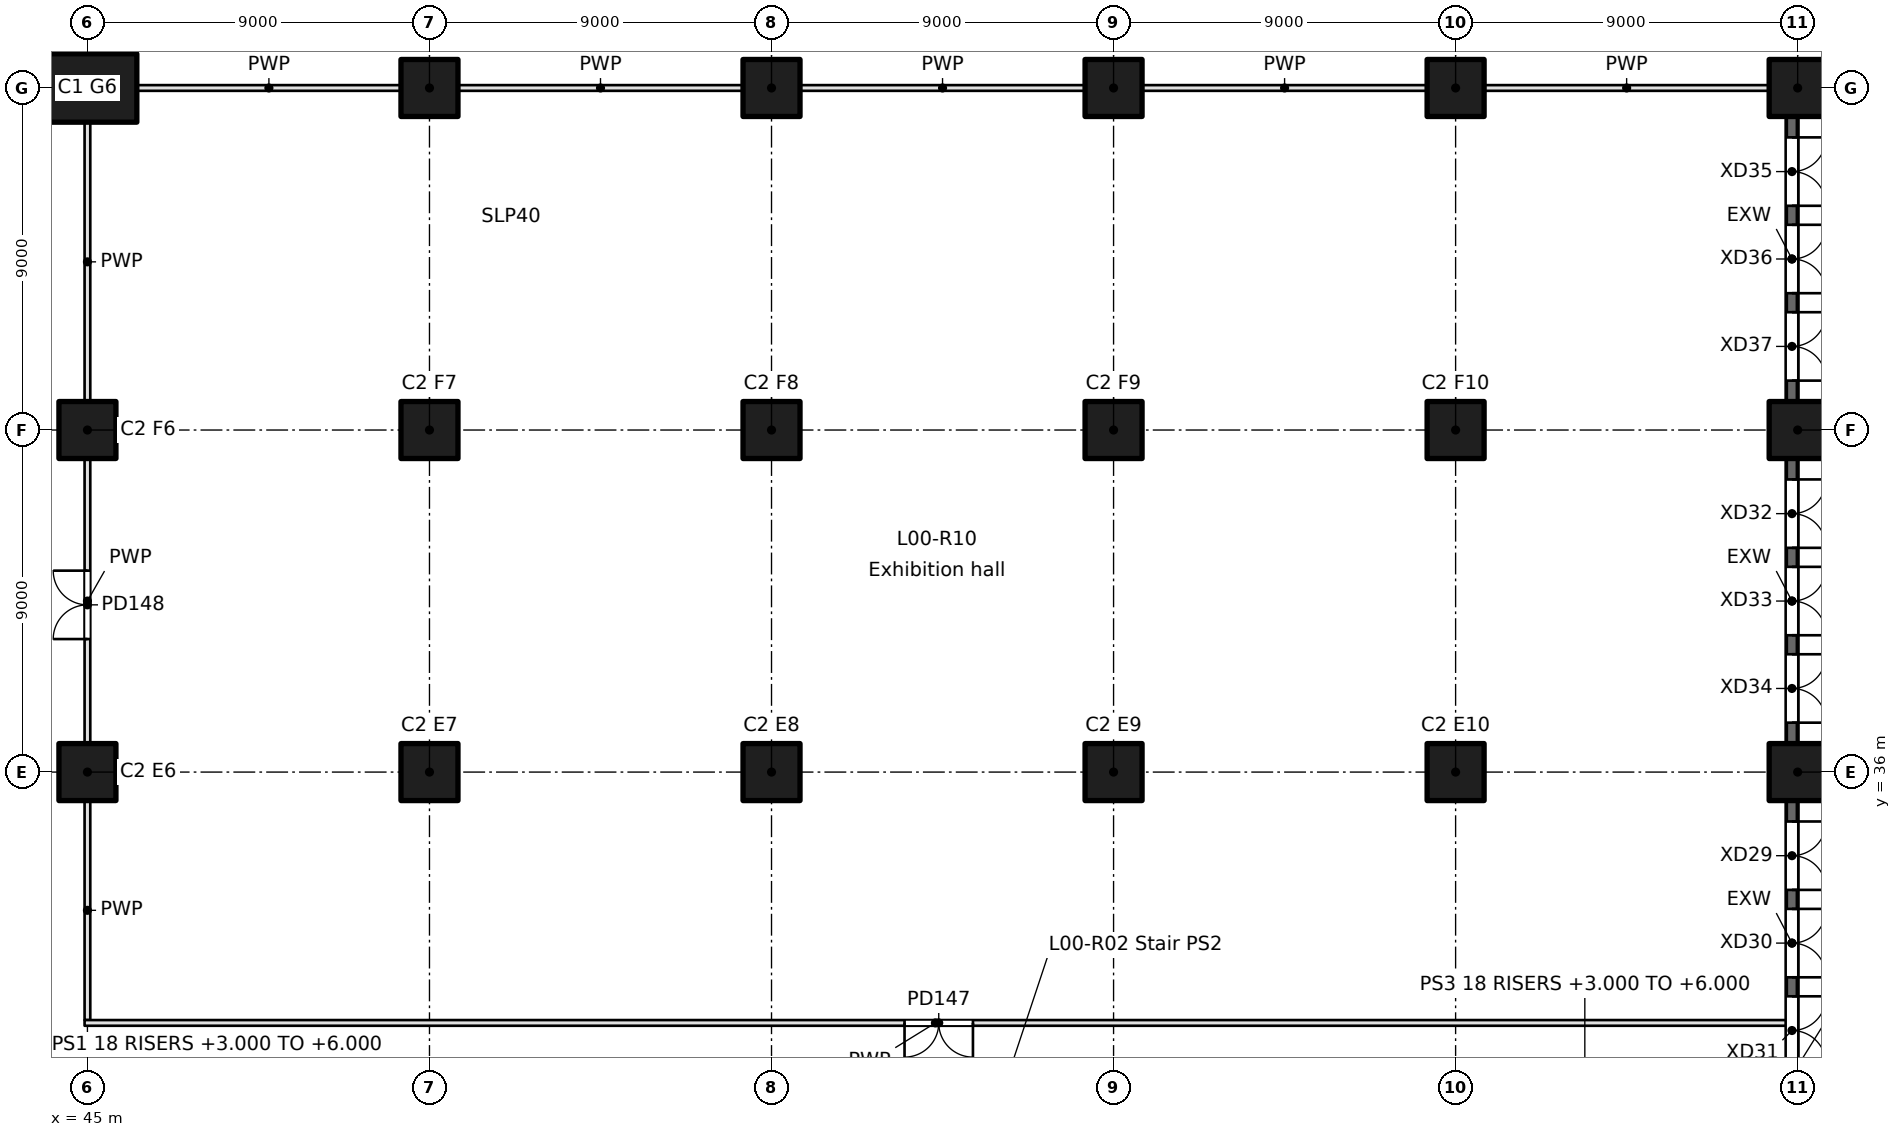
"""IFC4 building model, lengths in metres.
Left out: names, types, materials, properties, quantities, classifications, styles, units other than length and angle.
Written with IfcOpenShell. Run it as: python <this file> out.ifc"""

import sys

from ifc_helpers import new_model, si_unit, direction, frame, frame_2d, origin, origin_2d, place, context, subcontext, project, spatial, rectangle, extrude, element, fill, save


model = new_model("IFC4")
c1 = context("Model", 3, precision=1e-05, world=origin(), true_north=direction((0.0, 1.0)))
c2 = subcontext(c1, "Body", "Model", "MODEL_VIEW")
j1 = project(units=[si_unit("LENGTHUNIT", "METRE"), si_unit("PLANEANGLEUNIT", "RADIAN")], contexts=[c1])
p1 = place(None, origin())
s1 = spatial("IfcSite", under=j1, at=p1, CompositionType="ELEMENT")
p2 = place(p1, origin())
s2 = spatial("IfcBuilding", under=s1, at=p2, CompositionType="ELEMENT")
p3 = place(p2, origin())
s3 = spatial("IfcBuildingStorey", under=s2, at=p3, CompositionType="ELEMENT", Elevation=0.0)
for number, where, z_axis, x_axis in (
    (1, (45.0, 36.0, 0.0), (0.0, 0.0, 1.0), (1.0, 0.0, 0.0)),
    (2, (45.0, 45.0, 0.0), (0.0, 0.0, 1.0), (1.0, 0.0, 0.0)),
):
    element("IfcColumn", number, at=place(p3, frame(where, z_axis=z_axis, x_axis=x_axis)), inside=s3, PredefinedType="COLUMN", context=c2, shape_type="SweptSolid", body=[
        extrude(rectangle(XDim=1.5, YDim=1.5, at=origin_2d()), origin(), (0.0, 0.0, 1.0), 6.0),
    ])
p4 = place(p3, frame((45.0, 54.0, 0.0), z_axis=(0.0, 0.0, 1.0), x_axis=(1.0, 0.0, 0.0)))
e3 = element("IfcColumn", 3, at=p4, inside=s3, PredefinedType="COLUMN", context=c2, shape_type="SweptSolid", body=[
    extrude(rectangle(XDim=2.6, YDim=1.8, at=origin_2d()), origin(), (0.0, 0.0, 1.0), 6.0),
])
for number, where, z_axis, x_axis in (
    (4, (54.0, 54.0, 0.0), (0.0, 0.0, 1.0), (1.0, 0.0, 0.0)),
    (5, (63.0, 54.0, 0.0), (0.0, 0.0, 1.0), (1.0, 0.0, 0.0)),
    (6, (72.0, 54.0, 0.0), (0.0, 0.0, 1.0), (1.0, 0.0, 0.0)),
    (7, (81.0, 54.0, 0.0), (0.0, 0.0, 1.0), (1.0, 0.0, 0.0)),
    (8, (90.0, 54.0, 0.0), (0.0, 0.0, 1.0), (1.0, 0.0, 0.0)),
    (9, (90.0, 36.0, 0.0), (0.0, 0.0, 1.0), (1.0, 0.0, 0.0)),
    (10, (90.0, 45.0, 0.0), (0.0, 0.0, 1.0), (1.0, 0.0, 0.0)),
    (11, (54.0, 36.0, 0.0), (0.0, 0.0, 1.0), (1.0, 0.0, 0.0)),
    (12, (54.0, 45.0, 0.0), (0.0, 0.0, 1.0), (1.0, 0.0, 0.0)),
    (13, (63.0, 36.0, 0.0), (0.0, 0.0, 1.0), (1.0, 0.0, 0.0)),
    (14, (63.0, 45.0, 0.0), (0.0, 0.0, 1.0), (1.0, 0.0, 0.0)),
    (15, (72.0, 36.0, 0.0), (0.0, 0.0, 1.0), (1.0, 0.0, 0.0)),
    (16, (72.0, 45.0, 0.0), (0.0, 0.0, 1.0), (1.0, 0.0, 0.0)),
    (17, (81.0, 36.0, 0.0), (0.0, 0.0, 1.0), (1.0, 0.0, 0.0)),
    (18, (81.0, 45.0, 0.0), (0.0, 0.0, 1.0), (1.0, 0.0, 0.0)),
):
    element("IfcColumn", number, at=place(p3, frame(where, z_axis=z_axis, x_axis=x_axis)), inside=s3, PredefinedType="COLUMN", context=c2, shape_type="SweptSolid", body=[
        extrude(rectangle(XDim=1.5, YDim=1.5, at=origin_2d()), origin(), (0.0, 0.0, 1.0), 6.0),
    ])
p5 = place(p3, frame((89.85, 35.25, 0.0), z_axis=(0.0, 0.0, 1.0), x_axis=(0.0, -1.0, 0.0)))
e19 = element("IfcWall", 19, at=p5, inside=s3, PredefinedType="SOLIDWALL", context=c2, shape_type="SweptSolid", body=[
    extrude(rectangle(XDim=7.5, YDim=0.3, at=frame_2d((3.75, 0.0))), origin(), (0.0, 0.0, 1.0), 5.65),
])
p6 = place(p5, frame((0.55, 0.0, 0.0)))
e20 = element("IfcOpeningElement", 20, at=p6, cuts=e19, PredefinedType="OPENING", context=c2, shape_type="SweptSolid", body=[
    extrude(rectangle(XDim=1.8, YDim=2.4, at=frame_2d((0.9, 1.2))), frame((0.0, 0.15, 0.0), z_axis=(0.0, -1.0, 0.0), x_axis=(1.0, 0.0, 0.0)), (0.0, 0.0, 1.0), 0.3),
])
p7 = place(p5, frame((2.85, 0.0, 0.0)))
e21 = element("IfcOpeningElement", 21, at=p7, cuts=e19, PredefinedType="OPENING", context=c2, shape_type="SweptSolid", body=[
    extrude(rectangle(XDim=1.8, YDim=2.4, at=frame_2d((0.9, 1.2))), frame((0.0, 0.15, 0.0), z_axis=(0.0, -1.0, 0.0), x_axis=(1.0, 0.0, 0.0)), (0.0, 0.0, 1.0), 0.3),
])
p8 = place(p5, frame((5.15, 0.0, 0.0)))
e22 = element("IfcOpeningElement", 22, at=p8, cuts=e19, PredefinedType="OPENING", context=c2, shape_type="SweptSolid", body=[
    extrude(rectangle(XDim=1.8, YDim=2.4, at=frame_2d((0.9, 1.2))), frame((0.0, 0.15, 0.0), z_axis=(0.0, -1.0, 0.0), x_axis=(1.0, 0.0, 0.0)), (0.0, 0.0, 1.0), 0.3),
])
p9 = place(p3, frame((89.85, 44.25, 0.0), z_axis=(0.0, 0.0, 1.0), x_axis=(0.0, -1.0, 0.0)))
e23 = element("IfcWall", 23, at=p9, inside=s3, PredefinedType="SOLIDWALL", context=c2, shape_type="SweptSolid", body=[
    extrude(rectangle(XDim=7.5, YDim=0.3, at=frame_2d((3.75, 0.0))), origin(), (0.0, 0.0, 1.0), 5.65),
])
p10 = place(p9, frame((0.55, 0.0, 0.0)))
e24 = element("IfcOpeningElement", 24, at=p10, cuts=e23, PredefinedType="OPENING", context=c2, shape_type="SweptSolid", body=[
    extrude(rectangle(XDim=1.8, YDim=2.4, at=frame_2d((0.9, 1.2))), frame((0.0, 0.15, 0.0), z_axis=(0.0, -1.0, 0.0), x_axis=(1.0, 0.0, 0.0)), (0.0, 0.0, 1.0), 0.3),
])
p11 = place(p9, frame((2.85, 0.0, 0.0)))
e25 = element("IfcOpeningElement", 25, at=p11, cuts=e23, PredefinedType="OPENING", context=c2, shape_type="SweptSolid", body=[
    extrude(rectangle(XDim=1.8, YDim=2.4, at=frame_2d((0.9, 1.2))), frame((0.0, 0.15, 0.0), z_axis=(0.0, -1.0, 0.0), x_axis=(1.0, 0.0, 0.0)), (0.0, 0.0, 1.0), 0.3),
])
p12 = place(p9, frame((5.15, 0.0, 0.0)))
e26 = element("IfcOpeningElement", 26, at=p12, cuts=e23, PredefinedType="OPENING", context=c2, shape_type="SweptSolid", body=[
    extrude(rectangle(XDim=1.8, YDim=2.4, at=frame_2d((0.9, 1.2))), frame((0.0, 0.15, 0.0), z_axis=(0.0, -1.0, 0.0), x_axis=(1.0, 0.0, 0.0)), (0.0, 0.0, 1.0), 0.3),
])
p13 = place(p3, frame((89.85, 53.25, 0.0), z_axis=(0.0, 0.0, 1.0), x_axis=(0.0, -1.0, 0.0)))
e27 = element("IfcWall", 27, at=p13, inside=s3, PredefinedType="SOLIDWALL", context=c2, shape_type="SweptSolid", body=[
    extrude(rectangle(XDim=7.5, YDim=0.3, at=frame_2d((3.75, 0.0))), origin(), (0.0, 0.0, 1.0), 5.65),
])
p14 = place(p13, frame((0.55, 0.0, 0.0)))
e28 = element("IfcOpeningElement", 28, at=p14, cuts=e27, PredefinedType="OPENING", context=c2, shape_type="SweptSolid", body=[
    extrude(rectangle(XDim=1.8, YDim=2.4, at=frame_2d((0.9, 1.2))), frame((0.0, 0.15, 0.0), z_axis=(0.0, -1.0, 0.0), x_axis=(1.0, 0.0, 0.0)), (0.0, 0.0, 1.0), 0.3),
])
p15 = place(p13, frame((2.85, 0.0, 0.0)))
e29 = element("IfcOpeningElement", 29, at=p15, cuts=e27, PredefinedType="OPENING", context=c2, shape_type="SweptSolid", body=[
    extrude(rectangle(XDim=1.8, YDim=2.4, at=frame_2d((0.9, 1.2))), frame((0.0, 0.15, 0.0), z_axis=(0.0, -1.0, 0.0), x_axis=(1.0, 0.0, 0.0)), (0.0, 0.0, 1.0), 0.3),
])
p16 = place(p13, frame((5.15, 0.0, 0.0)))
e30 = element("IfcOpeningElement", 30, at=p16, cuts=e27, PredefinedType="OPENING", context=c2, shape_type="SweptSolid", body=[
    extrude(rectangle(XDim=1.8, YDim=2.4, at=frame_2d((0.9, 1.2))), frame((0.0, 0.15, 0.0), z_axis=(0.0, -1.0, 0.0), x_axis=(1.0, 0.0, 0.0)), (0.0, 0.0, 1.0), 0.3),
])
p17 = place(p3, frame((45.0, 29.475, 0.0), z_axis=(0.0, 0.0, 1.0), x_axis=(0.0, 1.0, 0.0)))
e31 = element("IfcWall", 31, at=p17, inside=s3, PredefinedType="PARTITIONING", context=c2, shape_type="SweptSolid", body=[
    extrude(rectangle(XDim=5.775, YDim=0.15, at=frame_2d((2.887, 0.0))), origin(), (0.0, 0.0, 1.0), 5.65),
])
p18 = place(p3, frame((45.0, 36.75, 0.0), z_axis=(0.0, 0.0, 1.0), x_axis=(0.0, 1.0, 0.0)))
e32 = element("IfcWall", 32, at=p18, inside=s3, PredefinedType="PARTITIONING", context=c2, shape_type="SweptSolid", body=[
    extrude(rectangle(XDim=7.5, YDim=0.15, at=frame_2d((3.75, 0.0))), origin(), (0.0, 0.0, 1.0), 5.65),
])
p19 = place(p18, frame((2.75, 0.0, 0.0)))
e33 = element("IfcOpeningElement", 33, at=p19, cuts=e32, PredefinedType="OPENING", context=c2, shape_type="SweptSolid", body=[
    extrude(rectangle(XDim=1.8, YDim=2.1, at=frame_2d((0.9, 1.05))), frame((0.0, 0.075, 0.0), z_axis=(0.0, -1.0, 0.0), x_axis=(1.0, 0.0, 0.0)), (0.0, 0.0, 1.0), 0.15),
])
p20 = place(p3, frame((45.0, 45.75, 0.0), z_axis=(0.0, 0.0, 1.0), x_axis=(0.0, 1.0, 0.0)))
e34 = element("IfcWall", 34, at=p20, inside=s3, PredefinedType="PARTITIONING", context=c2, shape_type="SweptSolid", body=[
    extrude(rectangle(XDim=7.35, YDim=0.15, at=frame_2d((3.675, 0.0))), origin(), (0.0, 0.0, 1.0), 5.65),
])
p21 = place(p3, frame((46.3, 54.0, 0.0), z_axis=(0.0, 0.0, 1.0), x_axis=(1.0, 0.0, 0.0)))
e35 = element("IfcWall", 35, at=p21, inside=s3, PredefinedType="PARTITIONING", context=c2, shape_type="SweptSolid", body=[
    extrude(rectangle(XDim=6.95, YDim=0.15, at=frame_2d((3.475, 0.0))), origin(), (0.0, 0.0, 1.0), 5.65),
])
for number, where, z_axis, x_axis in (
    (36, (54.75, 54.0, 0.0), (0.0, 0.0, 1.0), (1.0, 0.0, 0.0)),
    (37, (63.75, 54.0, 0.0), (0.0, 0.0, 1.0), (1.0, 0.0, 0.0)),
    (38, (72.75, 54.0, 0.0), (0.0, 0.0, 1.0), (1.0, 0.0, 0.0)),
    (39, (81.75, 54.0, 0.0), (0.0, 0.0, 1.0), (1.0, 0.0, 0.0)),
):
    element("IfcWall", number, at=place(p3, frame(where, z_axis=z_axis, x_axis=x_axis)), inside=s3, PredefinedType="PARTITIONING", context=c2, shape_type="SweptSolid", body=[
        extrude(rectangle(XDim=7.5, YDim=0.15, at=frame_2d((3.75, 0.0))), origin(), (0.0, 0.0, 1.0), 5.65),
    ])
p22 = place(p3, frame((89.7, 29.4, 0.0), z_axis=(0.0, 0.0, 1.0), x_axis=(-1.0, 0.0, 0.0)))
e40 = element("IfcWall", 40, at=p22, inside=s3, PredefinedType="PARTITIONING", context=c2, shape_type="SweptSolid", body=[
    extrude(rectangle(XDim=44.775, YDim=0.15, at=frame_2d((22.387, 0.0))), origin(), (0.0, 0.0, 1.0), 5.65),
])
p23 = place(p22, frame((21.4, 0.0, 0.0)))
e41 = element("IfcOpeningElement", 41, at=p23, cuts=e40, PredefinedType="OPENING", context=c2, shape_type="SweptSolid", body=[
    extrude(rectangle(XDim=1.8, YDim=2.1, at=frame_2d((0.9, 1.05))), frame((0.0, 0.075, 0.0), z_axis=(0.0, -1.0, 0.0), x_axis=(1.0, 0.0, 0.0)), (0.0, 0.0, 1.0), 0.15),
])
p24 = place(p6, origin())
e42 = element("IfcDoor", 42, at=p24, inside=s3, OperationType="DOUBLE_DOOR_SINGLE_SWING", PredefinedType="DOOR", context=c2, shape_type="SweptSolid", body=[
    extrude(rectangle(XDim=1.8, YDim=2.4, at=frame_2d((0.9, 1.2))), frame((0.0, 0.025, 0.0), z_axis=(0.0, -1.0, 0.0), x_axis=(1.0, 0.0, 0.0)), (0.0, 0.0, 1.0), 0.05),
])
fill(e20, e42)
p25 = place(p7, origin())
e43 = element("IfcDoor", 43, at=p25, inside=s3, OperationType="DOUBLE_DOOR_SINGLE_SWING", PredefinedType="DOOR", context=c2, shape_type="SweptSolid", body=[
    extrude(rectangle(XDim=1.8, YDim=2.4, at=frame_2d((0.9, 1.2))), frame((0.0, 0.025, 0.0), z_axis=(0.0, -1.0, 0.0), x_axis=(1.0, 0.0, 0.0)), (0.0, 0.0, 1.0), 0.05),
])
fill(e21, e43)
p26 = place(p8, origin())
e44 = element("IfcDoor", 44, at=p26, inside=s3, OperationType="DOUBLE_DOOR_SINGLE_SWING", PredefinedType="DOOR", context=c2, shape_type="SweptSolid", body=[
    extrude(rectangle(XDim=1.8, YDim=2.4, at=frame_2d((0.9, 1.2))), frame((0.0, 0.025, 0.0), z_axis=(0.0, -1.0, 0.0), x_axis=(1.0, 0.0, 0.0)), (0.0, 0.0, 1.0), 0.05),
])
fill(e22, e44)
p27 = place(p10, origin())
e45 = element("IfcDoor", 45, at=p27, inside=s3, OperationType="DOUBLE_DOOR_SINGLE_SWING", PredefinedType="DOOR", context=c2, shape_type="SweptSolid", body=[
    extrude(rectangle(XDim=1.8, YDim=2.4, at=frame_2d((0.9, 1.2))), frame((0.0, 0.025, 0.0), z_axis=(0.0, -1.0, 0.0), x_axis=(1.0, 0.0, 0.0)), (0.0, 0.0, 1.0), 0.05),
])
fill(e24, e45)
p28 = place(p11, origin())
e46 = element("IfcDoor", 46, at=p28, inside=s3, OperationType="DOUBLE_DOOR_SINGLE_SWING", PredefinedType="DOOR", context=c2, shape_type="SweptSolid", body=[
    extrude(rectangle(XDim=1.8, YDim=2.4, at=frame_2d((0.9, 1.2))), frame((0.0, 0.025, 0.0), z_axis=(0.0, -1.0, 0.0), x_axis=(1.0, 0.0, 0.0)), (0.0, 0.0, 1.0), 0.05),
])
fill(e25, e46)
p29 = place(p12, origin())
e47 = element("IfcDoor", 47, at=p29, inside=s3, OperationType="DOUBLE_DOOR_SINGLE_SWING", PredefinedType="DOOR", context=c2, shape_type="SweptSolid", body=[
    extrude(rectangle(XDim=1.8, YDim=2.4, at=frame_2d((0.9, 1.2))), frame((0.0, 0.025, 0.0), z_axis=(0.0, -1.0, 0.0), x_axis=(1.0, 0.0, 0.0)), (0.0, 0.0, 1.0), 0.05),
])
fill(e26, e47)
p30 = place(p14, origin())
e48 = element("IfcDoor", 48, at=p30, inside=s3, OperationType="DOUBLE_DOOR_SINGLE_SWING", PredefinedType="DOOR", context=c2, shape_type="SweptSolid", body=[
    extrude(rectangle(XDim=1.8, YDim=2.4, at=frame_2d((0.9, 1.2))), frame((0.0, 0.025, 0.0), z_axis=(0.0, -1.0, 0.0), x_axis=(1.0, 0.0, 0.0)), (0.0, 0.0, 1.0), 0.05),
])
fill(e28, e48)
p31 = place(p15, origin())
e49 = element("IfcDoor", 49, at=p31, inside=s3, OperationType="DOUBLE_DOOR_SINGLE_SWING", PredefinedType="DOOR", context=c2, shape_type="SweptSolid", body=[
    extrude(rectangle(XDim=1.8, YDim=2.4, at=frame_2d((0.9, 1.2))), frame((0.0, 0.025, 0.0), z_axis=(0.0, -1.0, 0.0), x_axis=(1.0, 0.0, 0.0)), (0.0, 0.0, 1.0), 0.05),
])
fill(e29, e49)
p32 = place(p16, origin())
e50 = element("IfcDoor", 50, at=p32, inside=s3, OperationType="DOUBLE_DOOR_SINGLE_SWING", PredefinedType="DOOR", context=c2, shape_type="SweptSolid", body=[
    extrude(rectangle(XDim=1.8, YDim=2.4, at=frame_2d((0.9, 1.2))), frame((0.0, 0.025, 0.0), z_axis=(0.0, -1.0, 0.0), x_axis=(1.0, 0.0, 0.0)), (0.0, 0.0, 1.0), 0.05),
])
fill(e30, e50)
p33 = place(p23, origin())
e51 = element("IfcDoor", 51, at=p33, inside=s3, OperationType="DOUBLE_DOOR_SINGLE_SWING", PredefinedType="DOOR", context=c2, shape_type="SweptSolid", body=[
    extrude(rectangle(XDim=1.8, YDim=2.1, at=frame_2d((0.9, 1.05))), frame((0.0, 0.025, 0.0), z_axis=(0.0, -1.0, 0.0), x_axis=(1.0, 0.0, 0.0)), (0.0, 0.0, 1.0), 0.05),
])
fill(e41, e51)
p34 = place(p19, origin())
e52 = element("IfcDoor", 52, at=p34, inside=s3, OperationType="DOUBLE_DOOR_SINGLE_SWING", PredefinedType="DOOR", context=c2, shape_type="SweptSolid", body=[
    extrude(rectangle(XDim=1.8, YDim=2.1, at=frame_2d((0.9, 1.05))), frame((0.0, 0.025, 0.0), z_axis=(0.0, -1.0, 0.0), x_axis=(1.0, 0.0, 0.0)), (0.0, 0.0, 1.0), 0.05),
])
fill(e33, e52)
save(model, sys.argv[1])
